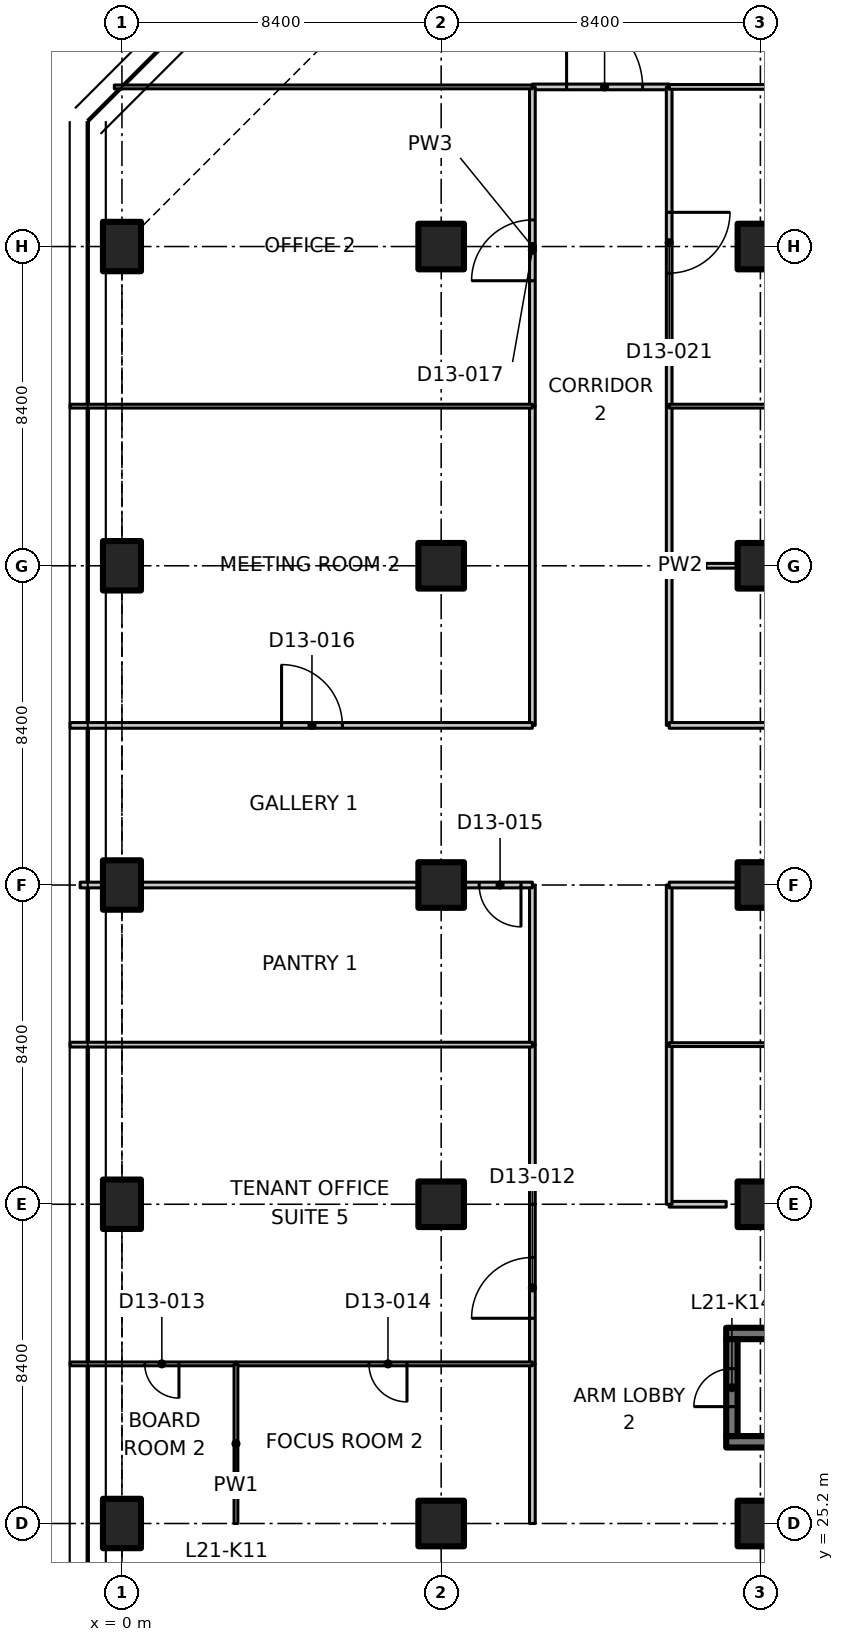
"""IFC4 building model, lengths in metres.
Left out: names, types, materials, properties, quantities, classifications, styles, units other than length and angle.
Written with IfcOpenShell. Run it as: python <this file> out.ifc"""

import sys

from ifc_helpers import new_model, si_unit, direction, frame, frame_2d, origin, origin_2d, place, context, subcontext, project, spatial, polyline, rectangle, outline, extrude, element, fill, save


model = new_model("IFC4")
c1 = context("Model", 3, precision=1e-05, world=origin(), true_north=direction((0.0, 1.0)))
c2 = subcontext(c1, "Body", "Model", "MODEL_VIEW")
j1 = project(units=[si_unit("LENGTHUNIT", "METRE"), si_unit("PLANEANGLEUNIT", "RADIAN")], contexts=[c1])
p1 = place(None, origin())
s1 = spatial("IfcSite", under=j1, at=p1, CompositionType="ELEMENT")
p2 = place(p1, origin())
s2 = spatial("IfcBuilding", under=s1, at=p2, CompositionType="ELEMENT")
p3 = place(p2, frame((0.0, 0.0, 91.7)))
s3 = spatial("IfcBuildingStorey", under=s2, at=p3, CompositionType="ELEMENT", Elevation=91.7)
for number, where, z_axis, x_axis in (
    (1, (0.0, 25.2, 0.0), (0.0, 0.0, 1.0), (1.0, 0.0, 0.0)),
    (2, (0.0, 33.6, 0.0), (0.0, 0.0, 1.0), (1.0, 0.0, 0.0)),
    (3, (0.0, 42.0, 0.0), (0.0, 0.0, 1.0), (1.0, 0.0, 0.0)),
    (4, (0.0, 50.4, 0.0), (0.0, 0.0, 1.0), (1.0, 0.0, 0.0)),
    (5, (0.0, 58.8, 0.0), (0.0, 0.0, 1.0), (1.0, 0.0, 0.0)),
):
    element("IfcColumn", number, at=place(p3, frame(where, z_axis=z_axis, x_axis=x_axis)), inside=s3, PredefinedType="COLUMN", context=c2, shape_type="SweptSolid", body=[
        extrude(rectangle(XDim=1.0, YDim=1.3, at=origin_2d()), origin(), (0.0, 0.0, 1.0), 3.35),
    ])
for number, where, z_axis, x_axis in (
    (6, (8.4, 25.2, 0.0), (0.0, 0.0, 1.0), (1.0, 0.0, 0.0)),
    (7, (8.4, 33.6, 0.0), (0.0, 0.0, 1.0), (1.0, 0.0, 0.0)),
    (8, (8.4, 42.0, 0.0), (0.0, 0.0, 1.0), (1.0, 0.0, 0.0)),
    (9, (8.4, 50.4, 0.0), (0.0, 0.0, 1.0), (1.0, 0.0, 0.0)),
    (10, (8.4, 58.8, 0.0), (0.0, 0.0, 1.0), (1.0, 0.0, 0.0)),
    (11, (16.8, 25.2, 0.0), (0.0, 0.0, 1.0), (1.0, 0.0, 0.0)),
    (12, (16.8, 33.6, 0.0), (0.0, 0.0, 1.0), (1.0, 0.0, 0.0)),
    (13, (16.8, 42.0, 0.0), (0.0, 0.0, 1.0), (1.0, 0.0, 0.0)),
    (14, (16.8, 50.4, 0.0), (0.0, 0.0, 1.0), (1.0, 0.0, 0.0)),
    (15, (16.8, 58.8, 0.0), (0.0, 0.0, 1.0), (1.0, 0.0, 0.0)),
):
    element("IfcColumn", number, at=place(p3, frame(where, z_axis=z_axis, x_axis=x_axis)), inside=s3, PredefinedType="COLUMN", context=c2, shape_type="SweptSolid", body=[
        extrude(rectangle(XDim=1.2, YDim=1.2, at=origin_2d()), origin(), (0.0, 0.0, 1.0), 3.35),
    ])
for number, where, z_axis, x_axis in (
    (16, (15.9, 27.35, 0.0), (0.0, 0.0, 1.0), (1.0, 0.0, 0.0)),
    (17, (15.9, 30.2, 0.0), (0.0, 0.0, 1.0), (1.0, 0.0, 0.0)),
):
    element("IfcWall", number, at=place(p3, frame(where, z_axis=z_axis, x_axis=x_axis)), inside=s3, PredefinedType="SHEAR", context=c2, shape_type="SweptSolid", body=[
        extrude(rectangle(XDim=8.2, YDim=0.3, at=frame_2d((4.1, 0.0))), origin(), (0.0, 0.0, 1.0), 3.35),
    ])
p4 = place(p3, frame((16.05, 27.5, 0.0), z_axis=(0.0, 0.0, 1.0), x_axis=(0.0, 1.0, 0.0)))
e18 = element("IfcWall", 18, at=p4, inside=s3, PredefinedType="SHEAR", context=c2, shape_type="SweptSolid", body=[
    extrude(rectangle(XDim=2.55, YDim=0.3, at=frame_2d((1.275, 0.0))), origin(), (0.0, 0.0, 1.0), 3.35),
])
p5 = place(p4, frame((0.775, 0.0, 0.0)))
e19 = element("IfcOpeningElement", 19, at=p5, cuts=e18, PredefinedType="OPENING", context=c2, shape_type="SweptSolid", body=[
    extrude(rectangle(XDim=1.0, YDim=2.1, at=frame_2d((0.5, 1.05))), frame((0.0, 0.16, 0.0), z_axis=(0.0, -1.0, 0.0), x_axis=(1.0, 0.0, 0.0)), (0.0, 0.0, 1.0), 0.32),
])
p6 = place(p3, frame((10.8, 29.4, 0.0), z_axis=(0.0, 0.0, 1.0), x_axis=(0.0, 1.0, 0.0)))
e20 = element("IfcWall", 20, at=p6, inside=s3, PredefinedType="PARTITIONING", context=c2, shape_type="SweptSolid", body=[
    extrude(rectangle(XDim=4.2, YDim=0.15, at=frame_2d((2.1, 0.0))), origin(), (0.0, 0.0, 1.0), 3.33),
])
p7 = place(p6, frame((1.2, 0.0, 0.0)))
e21 = element("IfcOpeningElement", 21, at=p7, cuts=e20, PredefinedType="OPENING", context=c2, shape_type="SweptSolid", body=[
    extrude(rectangle(XDim=1.6, YDim=2.1, at=frame_2d((0.8, 1.05))), frame((0.0, 0.085, 0.0), z_axis=(0.0, -1.0, 0.0), x_axis=(1.0, 0.0, 0.0)), (0.0, 0.0, 1.0), 0.17),
])
p8 = place(p3, frame((10.8, 25.2, 0.0), z_axis=(0.0, 0.0, 1.0), x_axis=(0.0, 1.0, 0.0)))
e22 = element("IfcWall", 22, at=p8, inside=s3, PredefinedType="PARTITIONING", context=c2, shape_type="SweptSolid", body=[
    extrude(rectangle(XDim=4.2, YDim=0.15, at=frame_2d((2.1, 0.0))), origin(), (0.0, 0.0, 1.0), 3.33),
])
p9 = place(p3, frame((14.4, 33.6, 0.0), z_axis=(0.0, 0.0, 1.0), x_axis=(1.0, 0.0, 0.0)))
e23 = element("IfcWall", 23, at=p9, inside=s3, PredefinedType="PARTITIONING", context=c2, shape_type="SweptSolid", body=[
    extrude(rectangle(XDim=1.5, YDim=0.15, at=frame_2d((0.75, 0.0))), origin(), (0.0, 0.0, 1.0), 3.33),
])
p10 = place(p3, frame((10.8, 63.0, 0.0), z_axis=(0.0, 0.0, 1.0), x_axis=(1.0, 0.0, 0.0)))
e24 = element("IfcWall", 24, at=p10, inside=s3, PredefinedType="PARTITIONING", context=c2, shape_type="SweptSolid", body=[
    extrude(rectangle(XDim=3.6, YDim=0.15, at=frame_2d((1.8, 0.0))), origin(), (0.0, 0.0, 1.0), 3.33),
])
p11 = place(p10, frame((0.9, 0.0, 0.0)))
e25 = element("IfcOpeningElement", 25, at=p11, cuts=e24, PredefinedType="OPENING", context=c2, shape_type="SweptSolid", body=[
    extrude(rectangle(XDim=2.0, YDim=2.4, at=frame_2d((1.0, 1.2))), frame((0.0, 0.085, 0.0), z_axis=(0.0, -1.0, 0.0), x_axis=(1.0, 0.0, 0.0)), (0.0, 0.0, 1.0), 0.17),
])
for number, where, z_axis, x_axis in (
    (26, (10.8, 33.6, 0.0), (0.0, 0.0, 1.0), (0.0, 1.0, 0.0)),
    (27, (10.8, 37.8, 0.0), (0.0, 0.0, 1.0), (0.0, 1.0, 0.0)),
):
    element("IfcWall", number, at=place(p3, frame(where, z_axis=z_axis, x_axis=x_axis)), inside=s3, PredefinedType="PARTITIONING", context=c2, shape_type="SweptSolid", body=[
        extrude(rectangle(XDim=4.2, YDim=0.15, at=frame_2d((2.1, 0.0))), origin(), (0.0, 0.0, 1.0), 3.33),
    ])
p12 = place(p3, frame((10.8, 46.2, 0.0), z_axis=(0.0, 0.0, 1.0), x_axis=(0.0, 1.0, 0.0)))
e28 = element("IfcWall", 28, at=p12, inside=s3, PredefinedType="PARTITIONING", context=c2, shape_type="SweptSolid", body=[
    extrude(rectangle(XDim=8.4, YDim=0.15, at=frame_2d((4.2, 0.0))), origin(), (0.0, 0.0, 1.0), 3.33),
])
p13 = place(p3, frame((10.8, 54.6, 0.0), z_axis=(0.0, 0.0, 1.0), x_axis=(0.0, 1.0, 0.0)))
e29 = element("IfcWall", 29, at=p13, inside=s3, PredefinedType="PARTITIONING", context=c2, shape_type="SweptSolid", body=[
    extrude(rectangle(XDim=8.4, YDim=0.15, at=frame_2d((4.2, 0.0))), origin(), (0.0, 0.0, 1.0), 3.33),
])
p14 = place(p13, frame((3.3, 0.0, 0.0)))
e30 = element("IfcOpeningElement", 30, at=p14, cuts=e29, PredefinedType="OPENING", context=c2, shape_type="SweptSolid", body=[
    extrude(rectangle(XDim=1.6, YDim=2.1, at=frame_2d((0.8, 1.05))), frame((0.0, 0.085, 0.0), z_axis=(0.0, -1.0, 0.0), x_axis=(1.0, 0.0, 0.0)), (0.0, 0.0, 1.0), 0.17),
])
for number, where, z_axis, x_axis in (
    (31, (14.4, 37.8, 0.0), (0.0, 0.0, 1.0), (0.0, -1.0, 0.0)),
    (32, (14.4, 42.0, 0.0), (0.0, 0.0, 1.0), (0.0, -1.0, 0.0)),
    (33, (14.4, 50.4, 0.0), (0.0, 0.0, 1.0), (0.0, -1.0, 0.0)),
):
    element("IfcWall", number, at=place(p3, frame(where, z_axis=z_axis, x_axis=x_axis)), inside=s3, PredefinedType="PARTITIONING", context=c2, shape_type="SweptSolid", body=[
        extrude(rectangle(XDim=4.2, YDim=0.15, at=frame_2d((2.1, 0.0))), origin(), (0.0, 0.0, 1.0), 3.33),
    ])
p15 = place(p3, frame((14.4, 63.0, 0.0), z_axis=(0.0, 0.0, 1.0), x_axis=(0.0, -1.0, 0.0)))
e34 = element("IfcWall", 34, at=p15, inside=s3, PredefinedType="PARTITIONING", context=c2, shape_type="SweptSolid", body=[
    extrude(rectangle(XDim=8.4, YDim=0.15, at=frame_2d((4.2, 0.0))), origin(), (0.0, 0.0, 1.0), 3.33),
])
p16 = place(p15, frame((3.3, 0.0, 0.0)))
e35 = element("IfcOpeningElement", 35, at=p16, cuts=e34, PredefinedType="OPENING", context=c2, shape_type="SweptSolid", body=[
    extrude(rectangle(XDim=1.6, YDim=2.1, at=frame_2d((0.8, 1.05))), frame((0.0, 0.085, 0.0), z_axis=(0.0, -1.0, 0.0), x_axis=(1.0, 0.0, 0.0)), (0.0, 0.0, 1.0), 0.17),
])
p17 = place(p3, frame((14.4, 54.6, 0.0), z_axis=(0.0, 0.0, 1.0), x_axis=(0.0, -1.0, 0.0)))
e36 = element("IfcWall", 36, at=p17, inside=s3, PredefinedType="PARTITIONING", context=c2, shape_type="SweptSolid", body=[
    extrude(rectangle(XDim=4.2, YDim=0.15, at=frame_2d((2.1, 0.0))), origin(), (0.0, 0.0, 1.0), 3.33),
])
p18 = place(p3, frame((10.8, 63.0, 0.0), z_axis=(0.0, 0.0, 1.0), x_axis=(-1.0, 0.0, 0.0)))
e37 = element("IfcWall", 37, at=p18, inside=s3, PredefinedType="PARTITIONING", context=c2, shape_type="SweptSolid", body=[
    extrude(outline(polyline([(0.0, 0.0), (11.0, 0.0), (11.0, 3.33), (7.266, 3.33), (7.264, 2.98), (5.936, 2.98), (5.934, 3.33), (0.0, 3.33), (0.0, 0.0)])), frame((0.0, 0.05, 0.0), z_axis=(0.0, -1.0, 0.0), x_axis=(1.0, 0.0, 0.0)), (0.0, 0.0, 1.0), 0.1),
])
p19 = place(p3, frame((25.4, 63.0, 0.0), z_axis=(0.0, 0.0, 1.0), x_axis=(-1.0, 0.0, 0.0)))
e38 = element("IfcWall", 38, at=p19, inside=s3, PredefinedType="PARTITIONING", context=c2, shape_type="SweptSolid", body=[
    extrude(outline(polyline([(0.0, 0.0), (11.0, 0.0), (11.0, 3.33), (5.078, 3.33), (5.076, 2.98), (3.724, 2.98), (3.722, 3.33), (0.0, 3.33), (0.0, 0.0)])), frame((0.0, 0.062, 0.0), z_axis=(0.0, -1.0, 0.0), x_axis=(1.0, 0.0, 0.0)), (0.0, 0.0, 1.0), 0.125),
])
p20 = place(p3, frame((10.8, 42.0, 0.0), z_axis=(0.0, 0.0, 1.0), x_axis=(-1.0, 0.0, 0.0)))
e39 = element("IfcWall", 39, at=p20, inside=s3, PredefinedType="PARTITIONING", context=c2, shape_type="SweptSolid", body=[
    extrude(rectangle(XDim=1.78, YDim=0.15, at=frame_2d((0.89, 0.0))), origin(), (0.0, 0.0, 1.0), 3.33),
])
p21 = place(p20, frame((0.3, 0.0, 0.0)))
e40 = element("IfcOpeningElement", 40, at=p21, cuts=e39, PredefinedType="OPENING", context=c2, shape_type="SweptSolid", body=[
    extrude(rectangle(XDim=1.1, YDim=2.1, at=frame_2d((0.55, 1.05))), frame((0.0, 0.085, 0.0), z_axis=(0.0, -1.0, 0.0), x_axis=(1.0, 0.0, 0.0)), (0.0, 0.0, 1.0), 0.17),
])
p22 = place(p3, frame((7.78, 42.0, 0.0), z_axis=(0.0, 0.0, 1.0), x_axis=(-1.0, 0.0, 0.0)))
e41 = element("IfcWall", 41, at=p22, inside=s3, PredefinedType="PARTITIONING", context=c2, shape_type="SweptSolid", body=[
    extrude(rectangle(XDim=7.26, YDim=0.15, at=frame_2d((3.63, 0.0))), origin(), (0.0, 0.0, 1.0), 3.33),
])
p23 = place(p3, frame((-0.52, 42.0, 0.0), z_axis=(0.0, 0.0, 1.0), x_axis=(-1.0, 0.0, 0.0)))
e42 = element("IfcWall", 42, at=p23, inside=s3, PredefinedType="PARTITIONING", context=c2, shape_type="SweptSolid", body=[
    extrude(rectangle(XDim=0.58, YDim=0.15, at=frame_2d((0.29, 0.0))), origin(), (0.0, 0.0, 1.0), 3.33),
])
p24 = place(p3, frame((-1.365, 46.2, 0.0), z_axis=(0.0, 0.0, 1.0), x_axis=(1.0, 0.0, 0.0)))
e43 = element("IfcWall", 43, at=p24, inside=s3, PredefinedType="PARTITIONING", context=c2, shape_type="SweptSolid", body=[
    extrude(outline(polyline([(0.0, 0.0), (12.165, 0.0), (12.165, 3.33), (1.815, 3.33), (1.813, 2.98), (0.917, 2.98), (0.915, 3.33), (0.265, 3.33), (0.0, 3.33), (0.0, 0.0)])), frame((0.0, 0.075, 0.0), z_axis=(0.0, -1.0, 0.0), x_axis=(1.0, 0.0, 0.0)), (0.0, 0.0, 1.0), 0.15),
])
p25 = place(p24, frame((5.565, 0.0, 0.0)))
e44 = element("IfcOpeningElement", 44, at=p25, cuts=e43, PredefinedType="OPENING", context=c2, shape_type="SweptSolid", body=[
    extrude(rectangle(XDim=1.6, YDim=2.1, at=frame_2d((0.8, 1.05))), frame((0.0, 0.085, 0.0), z_axis=(0.0, -1.0, 0.0), x_axis=(1.0, 0.0, 0.0)), (0.0, 0.0, 1.0), 0.17),
])
p26 = place(p3, frame((3.0, 29.4, 0.0), z_axis=(0.0, 0.0, 1.0), x_axis=(-1.0, 0.0, 0.0)))
e45 = element("IfcWall", 45, at=p26, inside=s3, PredefinedType="PARTITIONING", context=c2, shape_type="SweptSolid", body=[
    extrude(rectangle(XDim=4.365, YDim=0.1, at=frame_2d((2.183, 0.0))), origin(), (0.0, 0.0, 1.0), 2.98),
])
p27 = place(p26, frame((1.5, 0.0, 0.0)))
e46 = element("IfcOpeningElement", 46, at=p27, cuts=e45, PredefinedType="OPENING", context=c2, shape_type="SweptSolid", body=[
    extrude(rectangle(XDim=0.9, YDim=2.1, at=frame_2d((0.45, 1.05))), frame((0.0, 0.06, 0.0), z_axis=(0.0, -1.0, 0.0), x_axis=(1.0, 0.0, 0.0)), (0.0, 0.0, 1.0), 0.12),
])
p28 = place(p3, frame((10.8, 29.4, 0.0), z_axis=(0.0, 0.0, 1.0), x_axis=(-1.0, 0.0, 0.0)))
e47 = element("IfcWall", 47, at=p28, inside=s3, PredefinedType="PARTITIONING", context=c2, shape_type="SweptSolid", body=[
    extrude(rectangle(XDim=7.8, YDim=0.1, at=frame_2d((3.9, 0.0))), origin(), (0.0, 0.0, 1.0), 3.33),
])
p29 = place(p28, frame((3.3, 0.0, 0.0)))
e48 = element("IfcOpeningElement", 48, at=p29, cuts=e47, PredefinedType="OPENING", context=c2, shape_type="SweptSolid", body=[
    extrude(rectangle(XDim=1.0, YDim=2.1, at=frame_2d((0.5, 1.05))), frame((0.0, 0.06, 0.0), z_axis=(0.0, -1.0, 0.0), x_axis=(1.0, 0.0, 0.0)), (0.0, 0.0, 1.0), 0.12),
])
p30 = place(p3, frame((-1.365, 37.8, 0.0), z_axis=(0.0, 0.0, 1.0), x_axis=(1.0, 0.0, 0.0)))
e49 = element("IfcWall", 49, at=p30, inside=s3, PredefinedType="PARTITIONING", context=c2, shape_type="SweptSolid", body=[
    extrude(outline(polyline([(0.0, 0.0), (12.165, 0.0), (12.165, 3.33), (1.815, 3.33), (1.813, 2.98), (0.917, 2.98), (0.915, 3.33), (0.265, 3.33), (0.0, 3.33), (0.0, 0.0)])), frame((0.0, 0.062, 0.0), z_axis=(0.0, -1.0, 0.0), x_axis=(1.0, 0.0, 0.0)), (0.0, 0.0, 1.0), 0.125),
])
p31 = place(p3, frame((3.0, 29.4, 0.0), z_axis=(0.0, 0.0, 1.0), x_axis=(0.0, -1.0, 0.0)))
e50 = element("IfcWall", 50, at=p31, inside=s3, PredefinedType="PARTITIONING", context=c2, shape_type="SweptSolid", body=[
    extrude(rectangle(XDim=4.2, YDim=0.1, at=frame_2d((2.1, 0.0))), origin(), (0.0, 0.0, 1.0), 3.33),
])
p32 = place(p3, frame((-1.365, 54.6, 0.0), z_axis=(0.0, 0.0, 1.0), x_axis=(1.0, 0.0, 0.0)))
e51 = element("IfcWall", 51, at=p32, inside=s3, PredefinedType="PARTITIONING", context=c2, shape_type="SweptSolid", body=[
    extrude(outline(polyline([(0.0, 0.0), (12.165, 0.0), (12.165, 3.33), (1.815, 3.33), (1.813, 2.98), (0.917, 2.98), (0.915, 3.33), (0.265, 3.33), (0.0, 3.33), (0.0, 0.0)])), frame((0.0, 0.05, 0.0), z_axis=(0.0, -1.0, 0.0), x_axis=(1.0, 0.0, 0.0)), (0.0, 0.0, 1.0), 0.1),
])
p33 = place(p3, frame((16.18, 42.0, 0.0), z_axis=(0.0, 0.0, 1.0), x_axis=(-1.0, 0.0, 0.0)))
e52 = element("IfcWall", 52, at=p33, inside=s3, PredefinedType="PARTITIONING", context=c2, shape_type="SweptSolid", body=[
    extrude(rectangle(XDim=1.78, YDim=0.15, at=frame_2d((0.89, 0.0))), origin(), (0.0, 0.0, 1.0), 3.33),
])
p34 = place(p3, frame((14.4, 46.2, 0.0), z_axis=(0.0, 0.0, 1.0), x_axis=(1.0, 0.0, 0.0)))
e53 = element("IfcWall", 53, at=p34, inside=s3, PredefinedType="PARTITIONING", context=c2, shape_type="SweptSolid", body=[
    extrude(outline(polyline([(0.0, 0.0), (12.165, 0.0), (12.165, 3.33), (11.9, 3.33), (11.25, 3.33), (11.248, 2.98), (10.352, 2.98), (10.35, 3.33), (0.0, 3.33), (0.0, 0.0)])), frame((0.0, 0.075, 0.0), z_axis=(0.0, -1.0, 0.0), x_axis=(1.0, 0.0, 0.0)), (0.0, 0.0, 1.0), 0.15),
])
p35 = place(p34, frame((5.4, 0.0, 0.0)))
e54 = element("IfcOpeningElement", 54, at=p35, cuts=e53, PredefinedType="OPENING", context=c2, shape_type="SweptSolid", body=[
    extrude(rectangle(XDim=1.1, YDim=2.1, at=frame_2d((0.55, 1.05))), frame((0.0, 0.085, 0.0), z_axis=(0.0, -1.0, 0.0), x_axis=(1.0, 0.0, 0.0)), (0.0, 0.0, 1.0), 0.17),
])
p36 = place(p3, frame((14.4, 37.8, 0.0), z_axis=(0.0, 0.0, 1.0), x_axis=(1.0, 0.0, 0.0)))
e55 = element("IfcWall", 55, at=p36, inside=s3, PredefinedType="PARTITIONING", context=c2, shape_type="SweptSolid", body=[
    extrude(outline(polyline([(0.0, 0.0), (16.126, 0.0), (16.126, 3.33), (15.843, 3.33), (11.25, 3.33), (11.248, 2.98), (10.352, 2.98), (10.35, 3.33), (0.0, 3.33), (0.0, 0.0)])), frame((0.0, 0.05, 0.0), z_axis=(0.0, -1.0, 0.0), x_axis=(1.0, 0.0, 0.0)), (0.0, 0.0, 1.0), 0.1),
])
p37 = place(p3, frame((14.4, 50.4, 0.0), z_axis=(0.0, 0.0, 1.0), x_axis=(1.0, 0.0, 0.0)))
e56 = element("IfcWall", 56, at=p37, inside=s3, PredefinedType="PARTITIONING", context=c2, shape_type="SweptSolid", body=[
    extrude(rectangle(XDim=1.78, YDim=0.125, at=frame_2d((0.89, 0.0))), origin(), (0.0, 0.0, 1.0), 3.33),
])
p38 = place(p3, frame((24.0, 54.6, 0.0), z_axis=(0.0, 0.0, 1.0), x_axis=(-1.0, 0.0, 0.0)))
e57 = element("IfcWall", 57, at=p38, inside=s3, PredefinedType="PARTITIONING", context=c2, shape_type="SweptSolid", body=[
    extrude(rectangle(XDim=9.6, YDim=0.1, at=frame_2d((4.8, 0.0))), origin(), (0.0, 0.0, 1.0), 3.33),
])
p39 = place(p38, frame((4.2, 0.0, 0.0)))
e58 = element("IfcOpeningElement", 58, at=p39, cuts=e57, PredefinedType="OPENING", context=c2, shape_type="SweptSolid", body=[
    extrude(rectangle(XDim=1.2, YDim=2.1, at=frame_2d((0.6, 1.05))), frame((0.0, 0.06, 0.0), z_axis=(0.0, -1.0, 0.0), x_axis=(1.0, 0.0, 0.0)), (0.0, 0.0, 1.0), 0.12),
])
p40 = place(p5, origin())
e59 = element("IfcDoor", 59, at=p40, inside=s3, OperationType="SINGLE_SWING_RIGHT", PredefinedType="DOOR", context=c2, shape_type="SweptSolid", body=[
    extrude(rectangle(XDim=1.0, YDim=2.1, at=frame_2d((0.5, 1.05))), frame((0.0, 0.025, 0.0), z_axis=(0.0, -1.0, 0.0), x_axis=(1.0, 0.0, 0.0)), (0.0, 0.0, 1.0), 0.05),
])
fill(e19, e59)
p41 = place(p11, origin())
e60 = element("IfcDoor", 60, at=p41, inside=s3, OperationType="DOUBLE_DOOR_SINGLE_SWING", PredefinedType="DOOR", context=c2, shape_type="SweptSolid", body=[
    extrude(rectangle(XDim=2.0, YDim=2.4, at=frame_2d((1.0, 1.2))), frame((0.0, 0.025, 0.0), z_axis=(0.0, -1.0, 0.0), x_axis=(1.0, 0.0, 0.0)), (0.0, 0.0, 1.0), 0.05),
])
fill(e25, e60)
p42 = place(p7, origin())
e61 = element("IfcDoor", 61, at=p42, inside=s3, OperationType="DOUBLE_DOOR_SINGLE_SWING", PredefinedType="DOOR", context=c2, shape_type="SweptSolid", body=[
    extrude(rectangle(XDim=1.6, YDim=2.1, at=frame_2d((0.8, 1.05))), frame((0.0, 0.025, 0.0), z_axis=(0.0, -1.0, 0.0), x_axis=(1.0, 0.0, 0.0)), (0.0, 0.0, 1.0), 0.05),
])
fill(e21, e61)
p43 = place(p27, origin())
e62 = element("IfcDoor", 62, at=p43, inside=s3, OperationType="SINGLE_SWING_LEFT", PredefinedType="DOOR", context=c2, shape_type="SweptSolid", body=[
    extrude(rectangle(XDim=0.9, YDim=2.1, at=frame_2d((0.45, 1.05))), frame((0.0, 0.025, 0.0), z_axis=(0.0, -1.0, 0.0), x_axis=(1.0, 0.0, 0.0)), (0.0, 0.0, 1.0), 0.05),
])
fill(e46, e62)
p44 = place(p29, origin())
e63 = element("IfcDoor", 63, at=p44, inside=s3, OperationType="SINGLE_SWING_LEFT", PredefinedType="DOOR", context=c2, shape_type="SweptSolid", body=[
    extrude(rectangle(XDim=1.0, YDim=2.1, at=frame_2d((0.5, 1.05))), frame((0.0, 0.025, 0.0), z_axis=(0.0, -1.0, 0.0), x_axis=(1.0, 0.0, 0.0)), (0.0, 0.0, 1.0), 0.05),
])
fill(e48, e63)
p45 = place(p21, origin())
e64 = element("IfcDoor", 64, at=p45, inside=s3, OperationType="SINGLE_SWING_LEFT", PredefinedType="DOOR", context=c2, shape_type="SweptSolid", body=[
    extrude(rectangle(XDim=1.1, YDim=2.1, at=frame_2d((0.55, 1.05))), frame((0.0, 0.025, 0.0), z_axis=(0.0, -1.0, 0.0), x_axis=(1.0, 0.0, 0.0)), (0.0, 0.0, 1.0), 0.05),
])
fill(e40, e64)
p46 = place(p25, origin())
e65 = element("IfcDoor", 65, at=p46, inside=s3, OperationType="DOUBLE_DOOR_SINGLE_SWING", PredefinedType="DOOR", context=c2, shape_type="SweptSolid", body=[
    extrude(rectangle(XDim=1.6, YDim=2.1, at=frame_2d((0.8, 1.05))), frame((0.0, 0.025, 0.0), z_axis=(0.0, -1.0, 0.0), x_axis=(1.0, 0.0, 0.0)), (0.0, 0.0, 1.0), 0.05),
])
fill(e44, e65)
p47 = place(p14, origin())
e66 = element("IfcDoor", 66, at=p47, inside=s3, OperationType="DOUBLE_DOOR_SINGLE_SWING", PredefinedType="DOOR", context=c2, shape_type="SweptSolid", body=[
    extrude(rectangle(XDim=1.6, YDim=2.1, at=frame_2d((0.8, 1.05))), frame((0.0, 0.025, 0.0), z_axis=(0.0, -1.0, 0.0), x_axis=(1.0, 0.0, 0.0)), (0.0, 0.0, 1.0), 0.05),
])
fill(e30, e66)
p48 = place(p16, origin())
e67 = element("IfcDoor", 67, at=p48, inside=s3, OperationType="DOUBLE_DOOR_SINGLE_SWING", PredefinedType="DOOR", context=c2, shape_type="SweptSolid", body=[
    extrude(rectangle(XDim=1.6, YDim=2.1, at=frame_2d((0.8, 1.05))), frame((0.0, 0.025, 0.0), z_axis=(0.0, -1.0, 0.0), x_axis=(1.0, 0.0, 0.0)), (0.0, 0.0, 1.0), 0.05),
])
fill(e35, e67)
save(model, sys.argv[1])
